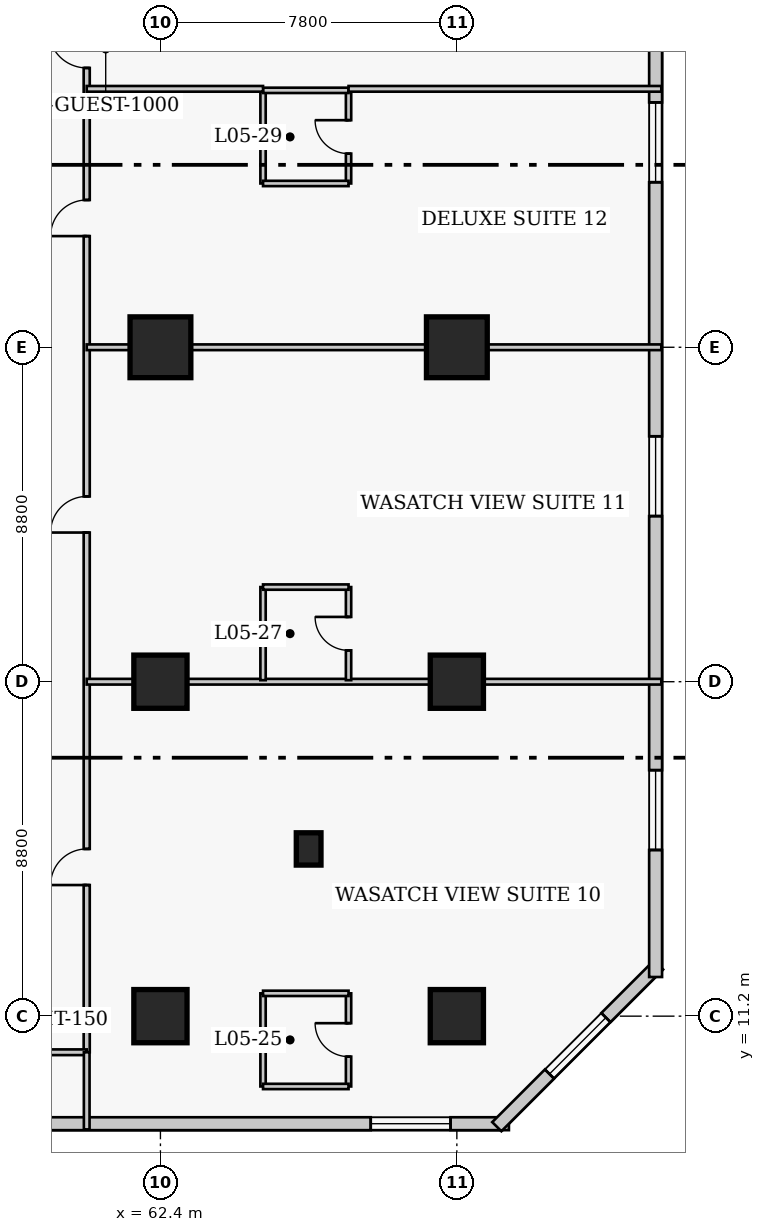
"""IFC4 building model, lengths in metres.
Left out: names, types, materials, properties, quantities, classifications, styles, units other than length and angle.
Written with IfcOpenShell. Run it as: python <this file> out.ifc"""

import sys

from ifc_helpers import new_model, si_unit, direction, frame, frame_2d, origin, origin_2d, place, context, subcontext, project, spatial, rectangle, extrude, element, fill, save


model = new_model("IFC4")
c1 = context("Model", 3, precision=1e-05, world=origin(), true_north=direction((0.0, 1.0)))
c2 = subcontext(c1, "Body", "Model", "MODEL_VIEW")
j1 = project(units=[si_unit("LENGTHUNIT", "METRE"), si_unit("PLANEANGLEUNIT", "RADIAN")], contexts=[c1])
p1 = place(None, origin())
s1 = spatial("IfcSite", under=j1, at=p1, CompositionType="ELEMENT")
p2 = place(p1, origin())
s2 = spatial("IfcBuilding", under=s1, at=p2, CompositionType="ELEMENT")
p3 = place(p2, frame((0.0, 0.0, 26.0)))
s3 = spatial("IfcBuildingStorey", under=s2, at=p3, CompositionType="ELEMENT", Elevation=26.0)
p4 = place(p3, frame((62.4, 11.2, 0.0), z_axis=(0.0, 0.0, 1.0), x_axis=(1.0, 0.0, 0.0)))
e1 = element("IfcColumn", 1, at=p4, inside=s3, PredefinedType="COLUMN", context=c2, shape_type="SweptSolid", body=[
    extrude(rectangle(XDim=1.4, YDim=1.4, at=origin_2d()), origin(), (0.0, 0.0, 1.0), 3.8),
])
p5 = place(p3, frame((62.4, 20.0, -0.26), z_axis=(0.0, 0.0, 1.0), x_axis=(1.0, 0.0, 0.0)))
e2 = element("IfcColumn", 2, at=p5, inside=s3, PredefinedType="COLUMN", context=c2, shape_type="SweptSolid", body=[
    extrude(rectangle(XDim=1.4, YDim=1.4, at=origin_2d()), origin(), (0.0, 0.0, 1.0), 4.06),
])
p6 = place(p3, frame((62.4, 28.8, 0.0), z_axis=(0.0, 0.0, 1.0), x_axis=(1.0, 0.0, 0.0)))
e3 = element("IfcColumn", 3, at=p6, inside=s3, PredefinedType="COLUMN", context=c2, shape_type="SweptSolid", body=[
    extrude(rectangle(XDim=1.6, YDim=1.6, at=origin_2d()), origin(), (0.0, 0.0, 1.0), 3.8),
])
for number, where, z_axis, x_axis in (
    (4, (70.2, 11.2, 0.0), (0.0, 0.0, 1.0), (1.0, 0.0, 0.0)),
    (5, (70.2, 20.0, 0.0), (0.0, 0.0, 1.0), (1.0, 0.0, 0.0)),
):
    element("IfcColumn", number, at=place(p3, frame(where, z_axis=z_axis, x_axis=x_axis)), inside=s3, PredefinedType="COLUMN", context=c2, shape_type="SweptSolid", body=[
        extrude(rectangle(XDim=1.4, YDim=1.4, at=origin_2d()), origin(), (0.0, 0.0, 1.0), 3.8),
    ])
p7 = place(p3, frame((70.2, 28.8, 0.0), z_axis=(0.0, 0.0, 1.0), x_axis=(1.0, 0.0, 0.0)))
e6 = element("IfcColumn", 6, at=p7, inside=s3, PredefinedType="COLUMN", context=c2, shape_type="SweptSolid", body=[
    extrude(rectangle(XDim=1.6, YDim=1.6, at=origin_2d()), origin(), (0.0, 0.0, 1.0), 3.8),
])
p8 = place(p3, frame((66.3, 15.6, 0.0), z_axis=(0.0, 0.0, 1.0), x_axis=(1.0, 0.0, 0.0)))
e7 = element("IfcColumn", 7, at=p8, inside=s3, PredefinedType="PILASTER", context=c2, shape_type="SweptSolid", body=[
    extrude(rectangle(XDim=0.65, YDim=0.85, at=origin_2d()), origin(), (0.0, 0.0, 1.0), 3.8),
])
p9 = place(p3, frame((41.68, 8.37, 0.0), z_axis=(0.0, 0.0, 1.0), x_axis=(1.0, 0.0, 0.0)))
e8 = element("IfcWall", 8, at=p9, inside=s3, PredefinedType="SOLIDWALL", context=c2, shape_type="SweptSolid", body=[
    extrude(rectangle(XDim=29.89, YDim=0.34, at=frame_2d((14.945, 0.0))), origin(), (0.0, 0.0, 1.0), 3.54),
])
p10 = place(p9, frame((2.036, 0.0, 0.85)))
e9 = element("IfcOpeningElement", 9, at=p10, cuts=e8, PredefinedType="OPENING", context=c2, shape_type="SweptSolid", body=[
    extrude(rectangle(XDim=2.1, YDim=1.85, at=frame_2d((1.05, 0.925))), frame((0.0, 0.18, 0.0), z_axis=(0.0, -1.0, 0.0), x_axis=(1.0, 0.0, 0.0)), (0.0, 0.0, 1.0), 0.36),
])
p11 = place(p9, frame((9.009, 0.0, 0.85)))
e10 = element("IfcOpeningElement", 10, at=p11, cuts=e8, PredefinedType="OPENING", context=c2, shape_type="SweptSolid", body=[
    extrude(rectangle(XDim=2.1, YDim=1.85, at=frame_2d((1.05, 0.925))), frame((0.0, 0.18, 0.0), z_axis=(0.0, -1.0, 0.0), x_axis=(1.0, 0.0, 0.0)), (0.0, 0.0, 1.0), 0.36),
])
p12 = place(p9, frame((26.254, 0.0, 0.85)))
e11 = element("IfcOpeningElement", 11, at=p12, cuts=e8, PredefinedType="OPENING", context=c2, shape_type="SweptSolid", body=[
    extrude(rectangle(XDim=2.1, YDim=1.85, at=frame_2d((1.05, 0.925))), frame((0.0, 0.18, 0.0), z_axis=(0.0, -1.0, 0.0), x_axis=(1.0, 0.0, 0.0)), (0.0, 0.0, 1.0), 0.36),
])
p13 = place(p9, frame((13.845, 0.0, 0.85)))
e12 = element("IfcOpeningElement", 12, at=p13, cuts=e8, PredefinedType="OPENING", context=c2, shape_type="SweptSolid", body=[
    extrude(rectangle(XDim=1.3, YDim=1.7, at=frame_2d((0.65, 0.85))), frame((0.0, 0.18, 0.0), z_axis=(0.0, -1.0, 0.0), x_axis=(1.0, 0.0, 0.0)), (0.0, 0.0, 1.0), 0.36),
])
p14 = place(p3, frame((71.251, 8.292, 0.0), z_axis=(0.0, 0.0, 1.0), x_axis=(0.707106781187, 0.707106781187, 0.0)))
e13 = element("IfcWall", 13, at=p14, inside=s3, PredefinedType="SOLIDWALL", context=c2, shape_type="SweptSolid", body=[
    extrude(rectangle(XDim=6.02, YDim=0.34, at=frame_2d((3.01, 0.0))), origin(), (0.0, 0.0, 1.0), 3.54),
])
p15 = place(p14, frame((1.96, 0.0, 0.85)))
e14 = element("IfcOpeningElement", 14, at=p15, cuts=e13, PredefinedType="OPENING", context=c2, shape_type="SweptSolid", body=[
    extrude(rectangle(XDim=2.1, YDim=1.85, at=frame_2d((1.05, 0.925))), frame((0.0, 0.18, 0.0), z_axis=(0.0, -1.0, 0.0), x_axis=(1.0, 0.0, 0.0)), (0.0, 0.0, 1.0), 0.36),
])
p16 = place(p3, frame((75.43, 12.23, 0.0), z_axis=(0.0, 0.0, 1.0), x_axis=(0.0, 1.0, 0.0)))
e15 = element("IfcWall", 15, at=p16, inside=s3, PredefinedType="SOLIDWALL", context=c2, shape_type="SweptSolid", body=[
    extrude(rectangle(XDim=35.14, YDim=0.34, at=frame_2d((17.57, 0.0))), origin(), (0.0, 0.0, 1.0), 3.54),
])
p17 = place(p16, frame((3.343, 0.0, 0.85)))
e16 = element("IfcOpeningElement", 16, at=p17, cuts=e15, PredefinedType="OPENING", context=c2, shape_type="SweptSolid", body=[
    extrude(rectangle(XDim=2.1, YDim=1.85, at=frame_2d((1.05, 0.925))), frame((0.0, 0.18, 0.0), z_axis=(0.0, -1.0, 0.0), x_axis=(1.0, 0.0, 0.0)), (0.0, 0.0, 1.0), 0.36),
])
p18 = place(p16, frame((12.127, 0.0, 0.85)))
e17 = element("IfcOpeningElement", 17, at=p18, cuts=e15, PredefinedType="OPENING", context=c2, shape_type="SweptSolid", body=[
    extrude(rectangle(XDim=2.1, YDim=1.85, at=frame_2d((1.05, 0.925))), frame((0.0, 0.18, 0.0), z_axis=(0.0, -1.0, 0.0), x_axis=(1.0, 0.0, 0.0)), (0.0, 0.0, 1.0), 0.36),
])
p19 = place(p16, frame((20.913, 0.0, 0.85)))
e18 = element("IfcOpeningElement", 18, at=p19, cuts=e15, PredefinedType="OPENING", context=c2, shape_type="SweptSolid", body=[
    extrude(rectangle(XDim=2.1, YDim=1.85, at=frame_2d((1.05, 0.925))), frame((0.0, 0.18, 0.0), z_axis=(0.0, -1.0, 0.0), x_axis=(1.0, 0.0, 0.0)), (0.0, 0.0, 1.0), 0.36),
])
p20 = place(p16, frame((29.698, 0.0, 0.85)))
e19 = element("IfcOpeningElement", 19, at=p20, cuts=e15, PredefinedType="OPENING", context=c2, shape_type="SweptSolid", body=[
    extrude(rectangle(XDim=2.1, YDim=1.85, at=frame_2d((1.05, 0.925))), frame((0.0, 0.18, 0.0), z_axis=(0.0, -1.0, 0.0), x_axis=(1.0, 0.0, 0.0)), (0.0, 0.0, 1.0), 0.36),
])
p21 = place(p3, frame((60.46, 10.25, 0.0), z_axis=(0.0, 0.0, 1.0), x_axis=(0.0, 1.0, 0.0)))
e20 = element("IfcWall", 20, at=p21, inside=s3, PredefinedType="PARTITIONING", context=c2, shape_type="SweptSolid", body=[
    extrude(rectangle(XDim=30.4, YDim=0.16, at=frame_2d((15.2, 0.0))), origin(), (0.0, 0.0, 1.0), 3.54),
])
p22 = place(p21, frame((4.4, 0.0, 0.0)))
e21 = element("IfcOpeningElement", 21, at=p22, cuts=e20, PredefinedType="OPENING", context=c2, shape_type="SweptSolid", body=[
    extrude(rectangle(XDim=0.95, YDim=2.1, at=frame_2d((0.475, 1.05))), frame((0.0, 0.09, 0.0), z_axis=(0.0, -1.0, 0.0), x_axis=(1.0, 0.0, 0.0)), (0.0, 0.0, 1.0), 0.18),
])
p23 = place(p21, frame((13.675, 0.0, 0.0)))
e22 = element("IfcOpeningElement", 22, at=p23, cuts=e20, PredefinedType="OPENING", context=c2, shape_type="SweptSolid", body=[
    extrude(rectangle(XDim=0.95, YDim=2.1, at=frame_2d((0.475, 1.05))), frame((0.0, 0.09, 0.0), z_axis=(0.0, -1.0, 0.0), x_axis=(1.0, 0.0, 0.0)), (0.0, 0.0, 1.0), 0.18),
])
p24 = place(p21, frame((21.475, 0.0, 0.0)))
e23 = element("IfcOpeningElement", 23, at=p24, cuts=e20, PredefinedType="OPENING", context=c2, shape_type="SweptSolid", body=[
    extrude(rectangle(XDim=0.95, YDim=2.1, at=frame_2d((0.475, 1.05))), frame((0.0, 0.09, 0.0), z_axis=(0.0, -1.0, 0.0), x_axis=(1.0, 0.0, 0.0)), (0.0, 0.0, 1.0), 0.18),
])
p25 = place(p21, frame((25.9, 0.0, 0.0)))
e24 = element("IfcOpeningElement", 24, at=p25, cuts=e20, PredefinedType="OPENING", context=c2, shape_type="SweptSolid", body=[
    extrude(rectangle(XDim=1.0, YDim=2.15, at=frame_2d((0.5, 1.075))), frame((0.0, 0.09, 0.0), z_axis=(0.0, -1.0, 0.0), x_axis=(1.0, 0.0, 0.0)), (0.0, 0.0, 1.0), 0.18),
])
p26 = place(p3, frame((58.24, 10.25, 0.0), z_axis=(0.0, 0.0, 1.0), x_axis=(1.0, 0.0, 0.0)))
e25 = element("IfcWall", 25, at=p26, inside=s3, PredefinedType="PARTITIONING", context=c2, shape_type="SweptSolid", body=[
    extrude(rectangle(XDim=2.22, YDim=0.15, at=frame_2d((1.11, 0.0))), origin(), (0.0, 0.0, 1.0), 3.54),
])
p27 = place(p3, frame((60.46, 8.22, 0.0), z_axis=(0.0, 0.0, 1.0), x_axis=(0.0, 1.0, 0.0)))
e26 = element("IfcWall", 26, at=p27, inside=s3, PredefinedType="PARTITIONING", context=c2, shape_type="SweptSolid", body=[
    extrude(rectangle(XDim=2.03, YDim=0.15, at=frame_2d((1.015, 0.0))), origin(), (0.0, 0.0, 1.0), 3.54),
])
p28 = place(p3, frame((65.1, 9.35, 0.0), z_axis=(0.0, 0.0, 1.0), x_axis=(0.0, 1.0, 0.0)))
e27 = element("IfcWall", 27, at=p28, inside=s3, PredefinedType="PLUMBINGWALL", context=c2, shape_type="SweptSolid", body=[
    extrude(rectangle(XDim=2.45, YDim=0.14, at=frame_2d((1.225, 0.0))), origin(), (0.0, 0.0, 1.0), 3.54),
])
p29 = place(p3, frame((67.35, 9.35, 0.0), z_axis=(0.0, 0.0, 1.0), x_axis=(0.0, 1.0, 0.0)))
e28 = element("IfcWall", 28, at=p29, inside=s3, PredefinedType="PLUMBINGWALL", context=c2, shape_type="SweptSolid", body=[
    extrude(rectangle(XDim=2.45, YDim=0.14, at=frame_2d((1.225, 0.0))), origin(), (0.0, 0.0, 1.0), 3.54),
])
p30 = place(p29, frame((0.785, 0.0, 0.0)))
e29 = element("IfcOpeningElement", 29, at=p30, cuts=e28, PredefinedType="OPENING", context=c2, shape_type="SweptSolid", body=[
    extrude(rectangle(XDim=0.88, YDim=2.05, at=frame_2d((0.44, 1.025))), frame((0.0, 0.08, 0.0), z_axis=(0.0, -1.0, 0.0), x_axis=(1.0, 0.0, 0.0)), (0.0, 0.0, 1.0), 0.16),
])
for number, where, z_axis, x_axis in (
    (30, (65.1, 9.35, 0.0), (0.0, 0.0, 1.0), (1.0, 0.0, 0.0)),
    (31, (65.1, 11.8, 0.0), (0.0, 0.0, 1.0), (1.0, 0.0, 0.0)),
):
    element("IfcWall", number, at=place(p3, frame(where, z_axis=z_axis, x_axis=x_axis)), inside=s3, PredefinedType="PLUMBINGWALL", context=c2, shape_type="SweptSolid", body=[
        extrude(rectangle(XDim=2.25, YDim=0.14, at=frame_2d((1.125, 0.0))), origin(), (0.0, 0.0, 1.0), 3.54),
    ])
p31 = place(p3, frame((60.46, 20.0, 0.0), z_axis=(0.0, 0.0, 1.0), x_axis=(1.0, 0.0, 0.0)))
e32 = element("IfcWall", 32, at=p31, inside=s3, PredefinedType="PARTITIONING", context=c2, shape_type="SweptSolid", body=[
    extrude(rectangle(XDim=15.12, YDim=0.15, at=frame_2d((7.56, 0.0))), origin(), (0.0, 0.0, 1.0), 2.593),
])
p32 = place(p3, frame((65.1, 20.04, 0.0), z_axis=(0.0, 0.0, 1.0), x_axis=(0.0, 1.0, 0.0)))
e33 = element("IfcWall", 33, at=p32, inside=s3, PredefinedType="PLUMBINGWALL", context=c2, shape_type="SweptSolid", body=[
    extrude(rectangle(XDim=2.45, YDim=0.14, at=frame_2d((1.225, 0.0))), origin(), (0.0, 0.0, 1.0), 3.54),
])
p33 = place(p3, frame((67.35, 20.04, 0.0), z_axis=(0.0, 0.0, 1.0), x_axis=(0.0, 1.0, 0.0)))
e34 = element("IfcWall", 34, at=p33, inside=s3, PredefinedType="PLUMBINGWALL", context=c2, shape_type="SweptSolid", body=[
    extrude(rectangle(XDim=2.45, YDim=0.14, at=frame_2d((1.225, 0.0))), origin(), (0.0, 0.0, 1.0), 3.54),
])
p34 = place(p33, frame((0.785, 0.0, 0.0)))
e35 = element("IfcOpeningElement", 35, at=p34, cuts=e34, PredefinedType="OPENING", context=c2, shape_type="SweptSolid", body=[
    extrude(rectangle(XDim=0.88, YDim=2.05, at=frame_2d((0.44, 1.025))), frame((0.0, 0.08, 0.0), z_axis=(0.0, -1.0, 0.0), x_axis=(1.0, 0.0, 0.0)), (0.0, 0.0, 1.0), 0.16),
])
p35 = place(p3, frame((65.1, 22.49, 0.0), z_axis=(0.0, 0.0, 1.0), x_axis=(1.0, 0.0, 0.0)))
e36 = element("IfcWall", 36, at=p35, inside=s3, PredefinedType="PLUMBINGWALL", context=c2, shape_type="SweptSolid", body=[
    extrude(rectangle(XDim=2.25, YDim=0.14, at=frame_2d((1.125, 0.0))), origin(), (0.0, 0.0, 1.0), 3.54),
])
p36 = place(p3, frame((60.46, 28.8, 0.0), z_axis=(0.0, 0.0, 1.0), x_axis=(1.0, 0.0, 0.0)))
e37 = element("IfcWall", 37, at=p36, inside=s3, PredefinedType="PARTITIONING", context=c2, shape_type="SweptSolid", body=[
    extrude(rectangle(XDim=15.12, YDim=0.15, at=frame_2d((7.56, 0.0))), origin(), (0.0, 0.0, 1.0), 2.593),
])
p37 = place(p3, frame((65.1, 33.11, 0.0), z_axis=(0.0, 0.0, 1.0), x_axis=(0.0, 1.0, 0.0)))
e38 = element("IfcWall", 38, at=p37, inside=s3, PredefinedType="PLUMBINGWALL", context=c2, shape_type="SweptSolid", body=[
    extrude(rectangle(XDim=2.45, YDim=0.14, at=frame_2d((1.225, 0.0))), origin(), (0.0, 0.0, 1.0), 3.54),
])
p38 = place(p3, frame((67.35, 33.11, 0.0), z_axis=(0.0, 0.0, 1.0), x_axis=(0.0, 1.0, 0.0)))
e39 = element("IfcWall", 39, at=p38, inside=s3, PredefinedType="PLUMBINGWALL", context=c2, shape_type="SweptSolid", body=[
    extrude(rectangle(XDim=2.45, YDim=0.14, at=frame_2d((1.225, 0.0))), origin(), (0.0, 0.0, 1.0), 3.54),
])
p39 = place(p38, frame((0.785, 0.0, 0.0)))
e40 = element("IfcOpeningElement", 40, at=p39, cuts=e39, PredefinedType="OPENING", context=c2, shape_type="SweptSolid", body=[
    extrude(rectangle(XDim=0.88, YDim=2.05, at=frame_2d((0.44, 1.025))), frame((0.0, 0.08, 0.0), z_axis=(0.0, -1.0, 0.0), x_axis=(1.0, 0.0, 0.0)), (0.0, 0.0, 1.0), 0.16),
])
for number, where, z_axis, x_axis in (
    (41, (65.1, 33.11, 0.0), (0.0, 0.0, 1.0), (1.0, 0.0, 0.0)),
    (42, (65.1, 35.56, 0.0), (0.0, 0.0, 1.0), (1.0, 0.0, 0.0)),
):
    element("IfcWall", number, at=place(p3, frame(where, z_axis=z_axis, x_axis=x_axis)), inside=s3, PredefinedType="PLUMBINGWALL", context=c2, shape_type="SweptSolid", body=[
        extrude(rectangle(XDim=2.25, YDim=0.14, at=frame_2d((1.125, 0.0))), origin(), (0.0, 0.0, 1.0), 3.54),
    ])
p40 = place(p3, frame((60.46, 35.6, 0.0), z_axis=(0.0, 0.0, 1.0), x_axis=(1.0, 0.0, 0.0)))
e43 = element("IfcWall", 43, at=p40, inside=s3, PredefinedType="PARTITIONING", context=c2, shape_type="SweptSolid", body=[
    extrude(rectangle(XDim=4.64, YDim=0.15, at=frame_2d((2.32, 0.0))), origin(), (0.0, 0.0, 1.0), 3.54),
])
p41 = place(p3, frame((67.35, 35.6, 0.0), z_axis=(0.0, 0.0, 1.0), x_axis=(1.0, 0.0, 0.0)))
e44 = element("IfcWall", 44, at=p41, inside=s3, PredefinedType="PARTITIONING", context=c2, shape_type="SweptSolid", body=[
    extrude(rectangle(XDim=8.23, YDim=0.15, at=frame_2d((4.115, 0.0))), origin(), (0.0, 0.0, 1.0), 3.54),
])
p42 = place(p12, origin())
e45 = element("IfcWindow", 45, at=p42, inside=s3, PartitioningType="SINGLE_PANEL", PredefinedType="WINDOW", context=c2, shape_type="SweptSolid", body=[
    extrude(rectangle(XDim=2.1, YDim=1.85, at=frame_2d((1.05, 0.925))), frame((0.0, 0.03, 0.0), z_axis=(0.0, -1.0, 0.0), x_axis=(1.0, 0.0, 0.0)), (0.0, 0.0, 1.0), 0.06),
])
fill(e11, e45)
p43 = place(p15, origin())
e46 = element("IfcWindow", 46, at=p43, inside=s3, PartitioningType="SINGLE_PANEL", PredefinedType="WINDOW", context=c2, shape_type="SweptSolid", body=[
    extrude(rectangle(XDim=2.1, YDim=1.85, at=frame_2d((1.05, 0.925))), frame((0.0, 0.03, 0.0), z_axis=(0.0, -1.0, 0.0), x_axis=(1.0, 0.0, 0.0)), (0.0, 0.0, 1.0), 0.06),
])
fill(e14, e46)
p44 = place(p17, origin())
e47 = element("IfcWindow", 47, at=p44, inside=s3, PartitioningType="SINGLE_PANEL", PredefinedType="WINDOW", context=c2, shape_type="SweptSolid", body=[
    extrude(rectangle(XDim=2.1, YDim=1.85, at=frame_2d((1.05, 0.925))), frame((0.0, 0.03, 0.0), z_axis=(0.0, -1.0, 0.0), x_axis=(1.0, 0.0, 0.0)), (0.0, 0.0, 1.0), 0.06),
])
fill(e16, e47)
p45 = place(p18, origin())
e48 = element("IfcWindow", 48, at=p45, inside=s3, PartitioningType="SINGLE_PANEL", PredefinedType="WINDOW", context=c2, shape_type="SweptSolid", body=[
    extrude(rectangle(XDim=2.1, YDim=1.85, at=frame_2d((1.05, 0.925))), frame((0.0, 0.03, 0.0), z_axis=(0.0, -1.0, 0.0), x_axis=(1.0, 0.0, 0.0)), (0.0, 0.0, 1.0), 0.06),
])
fill(e17, e48)
p46 = place(p19, origin())
e49 = element("IfcWindow", 49, at=p46, inside=s3, PartitioningType="SINGLE_PANEL", PredefinedType="WINDOW", context=c2, shape_type="SweptSolid", body=[
    extrude(rectangle(XDim=2.1, YDim=1.85, at=frame_2d((1.05, 0.925))), frame((0.0, 0.03, 0.0), z_axis=(0.0, -1.0, 0.0), x_axis=(1.0, 0.0, 0.0)), (0.0, 0.0, 1.0), 0.06),
])
fill(e18, e49)
p47 = place(p30, origin())
e50 = element("IfcDoor", 50, at=p47, inside=s3, OperationType="SINGLE_SWING_RIGHT", PredefinedType="DOOR", context=c2, shape_type="SweptSolid", body=[
    extrude(rectangle(XDim=0.88, YDim=2.05, at=frame_2d((0.44, 1.025))), frame((0.0, 0.025, 0.0), z_axis=(0.0, -1.0, 0.0), x_axis=(1.0, 0.0, 0.0)), (0.0, 0.0, 1.0), 0.05),
])
fill(e29, e50)
p48 = place(p22, origin())
e51 = element("IfcDoor", 51, at=p48, inside=s3, OperationType="SINGLE_SWING_LEFT", PredefinedType="DOOR", context=c2, shape_type="SweptSolid", body=[
    extrude(rectangle(XDim=0.95, YDim=2.1, at=frame_2d((0.475, 1.05))), frame((0.0, 0.025, 0.0), z_axis=(0.0, -1.0, 0.0), x_axis=(1.0, 0.0, 0.0)), (0.0, 0.0, 1.0), 0.05),
])
fill(e21, e51)
p49 = place(p34, origin())
e52 = element("IfcDoor", 52, at=p49, inside=s3, OperationType="SINGLE_SWING_RIGHT", PredefinedType="DOOR", context=c2, shape_type="SweptSolid", body=[
    extrude(rectangle(XDim=0.88, YDim=2.05, at=frame_2d((0.44, 1.025))), frame((0.0, 0.025, 0.0), z_axis=(0.0, -1.0, 0.0), x_axis=(1.0, 0.0, 0.0)), (0.0, 0.0, 1.0), 0.05),
])
fill(e35, e52)
p50 = place(p23, origin())
e53 = element("IfcDoor", 53, at=p50, inside=s3, OperationType="SINGLE_SWING_LEFT", PredefinedType="DOOR", context=c2, shape_type="SweptSolid", body=[
    extrude(rectangle(XDim=0.95, YDim=2.1, at=frame_2d((0.475, 1.05))), frame((0.0, 0.025, 0.0), z_axis=(0.0, -1.0, 0.0), x_axis=(1.0, 0.0, 0.0)), (0.0, 0.0, 1.0), 0.05),
])
fill(e22, e53)
p51 = place(p39, origin())
e54 = element("IfcDoor", 54, at=p51, inside=s3, OperationType="SINGLE_SWING_RIGHT", PredefinedType="DOOR", context=c2, shape_type="SweptSolid", body=[
    extrude(rectangle(XDim=0.88, YDim=2.05, at=frame_2d((0.44, 1.025))), frame((0.0, 0.025, 0.0), z_axis=(0.0, -1.0, 0.0), x_axis=(1.0, 0.0, 0.0)), (0.0, 0.0, 1.0), 0.05),
])
fill(e40, e54)
p52 = place(p24, origin())
e55 = element("IfcDoor", 55, at=p52, inside=s3, OperationType="SINGLE_SWING_LEFT", PredefinedType="DOOR", context=c2, shape_type="SweptSolid", body=[
    extrude(rectangle(XDim=0.95, YDim=2.1, at=frame_2d((0.475, 1.05))), frame((0.0, 0.025, 0.0), z_axis=(0.0, -1.0, 0.0), x_axis=(1.0, 0.0, 0.0)), (0.0, 0.0, 1.0), 0.05),
])
fill(e23, e55)
p53 = place(p25, origin())
e56 = element("IfcDoor", 56, at=p53, inside=s3, OperationType="SINGLE_SWING_RIGHT", PredefinedType="DOOR", context=c2, shape_type="SweptSolid", body=[
    extrude(rectangle(XDim=1.0, YDim=2.15, at=frame_2d((0.5, 1.075))), frame((0.0, 0.025, 0.0), z_axis=(0.0, -1.0, 0.0), x_axis=(1.0, 0.0, 0.0)), (0.0, 0.0, 1.0), 0.05),
])
fill(e24, e56)
save(model, sys.argv[1])
